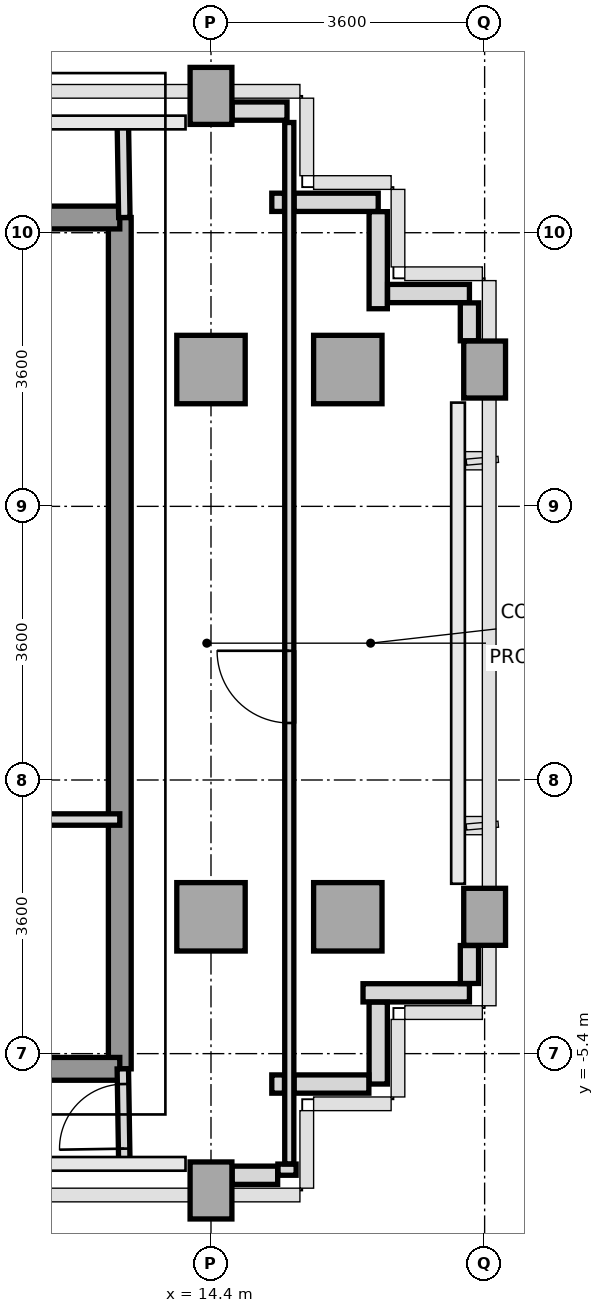
"""IFC4 building model, lengths in metres.
Left out: names, types, materials, properties, quantities, classifications, styles, units other than length and angle.
Written with IfcOpenShell. Run it as: python <this file> out.ifc"""

import sys

from ifc_helpers import new_model, si_unit, direction, frame, frame_2d, origin, origin_2d, place, context, subcontext, project, spatial, rectangle, extrude, source, transform, mapped, element, fill, save


model = new_model("IFC4")
c1 = context("Model", 3, precision=1e-05, world=origin(), true_north=direction((0.0, 1.0)))
c2 = subcontext(c1, "Body", "Model", "MODEL_VIEW")
j1 = project(units=[si_unit("LENGTHUNIT", "METRE"), si_unit("PLANEANGLEUNIT", "RADIAN")], contexts=[c1])
p1 = place(None, origin())
s1 = spatial("IfcSite", under=j1, at=p1, CompositionType="ELEMENT")
p2 = place(p1, origin())
s2 = spatial("IfcBuilding", under=s1, at=p2, CompositionType="ELEMENT")
p3 = place(p2, frame((0.0, 0.0, 239.6)))
s3 = spatial("IfcBuildingStorey", under=s2, at=p3, CompositionType="ELEMENT", Elevation=239.6)
m1 = source(origin(), c2, "Body", "SweptSolid", [
    extrude(rectangle(XDim=0.55, YDim=0.75, at=origin_2d()), origin(), (0.0, 0.0, 1.0), 3.01),
])
p4 = place(p3, frame((14.4, -7.2, 0.0), z_axis=(0.0, 0.0, 1.0), x_axis=(1.0, 0.0, 0.0)))
e1 = element("IfcColumn", 1, at=p4, inside=s3, PredefinedType="COLUMN", context=c2, shape_type="MappedRepresentation", body=[
    mapped(m1, transform((0.0, 0.0, 0.0), x_axis=(1.0, 0.0, 0.0), y_axis=(0.0, 1.0, 0.0), z_axis=(0.0, 0.0, 1.0), scale=1.0)),
])
m2 = source(origin(), c2, "Body", "SweptSolid", [
    extrude(rectangle(XDim=0.9, YDim=0.9, at=origin_2d()), origin(), (0.0, 0.0, 1.0), 3.01),
])
for number, where, z_axis, x_axis in (
    (2, (14.4, -3.6, 0.0), (0.0, 0.0, 1.0), (1.0, 0.0, 0.0)),
    (3, (14.4, 3.6, 0.0), (0.0, 0.0, 1.0), (1.0, 0.0, 0.0)),
):
    element("IfcColumn", number, at=place(p3, frame(where, z_axis=z_axis, x_axis=x_axis)), inside=s3, PredefinedType="COLUMN", context=c2, shape_type="MappedRepresentation", body=[
        mapped(m2, transform((0.0, 0.0, 0.0), x_axis=(1.0, 0.0, 0.0), y_axis=(0.0, 1.0, 0.0), z_axis=(0.0, 0.0, 1.0), scale=1.0)),
    ])
p5 = place(p3, frame((14.4, 7.2, 0.0), z_axis=(0.0, 0.0, 1.0), x_axis=(1.0, 0.0, 0.0)))
e4 = element("IfcColumn", 4, at=p5, inside=s3, PredefinedType="COLUMN", context=c2, shape_type="MappedRepresentation", body=[
    mapped(m1, transform((0.0, 0.0, 0.0), x_axis=(1.0, 0.0, 0.0), y_axis=(0.0, 1.0, 0.0), z_axis=(0.0, 0.0, 1.0), scale=1.0)),
])
for number, where, z_axis, x_axis in (
    (5, (16.2, -3.6, 0.0), (0.0, 0.0, 1.0), (1.0, 0.0, 0.0)),
    (6, (16.2, 3.6, 0.0), (0.0, 0.0, 1.0), (1.0, 0.0, 0.0)),
):
    element("IfcColumn", number, at=place(p3, frame(where, z_axis=z_axis, x_axis=x_axis)), inside=s3, PredefinedType="COLUMN", context=c2, shape_type="MappedRepresentation", body=[
        mapped(m2, transform((0.0, 0.0, 0.0), x_axis=(1.0, 0.0, 0.0), y_axis=(0.0, 1.0, 0.0), z_axis=(0.0, 0.0, 1.0), scale=1.0)),
    ])
for number, where, z_axis, x_axis in (
    (7, (18.0, -3.6, 0.0), (0.0, 0.0, 1.0), (1.0, 0.0, 0.0)),
    (8, (18.0, 3.6, 0.0), (0.0, 0.0, 1.0), (1.0, 0.0, 0.0)),
):
    element("IfcColumn", number, at=place(p3, frame(where, z_axis=z_axis, x_axis=x_axis)), inside=s3, PredefinedType="COLUMN", context=c2, shape_type="MappedRepresentation", body=[
        mapped(m1, transform((0.0, 0.0, 0.0), x_axis=(1.0, 0.0, 0.0), y_axis=(0.0, 1.0, 0.0), z_axis=(0.0, 0.0, 1.0), scale=1.0)),
    ])
p6 = place(p3, frame((17.8, -4.6, 0.0), z_axis=(0.0, 0.0, 1.0), x_axis=(-1.0, 0.0, 0.0)))
e9 = element("IfcWall", 9, at=p6, inside=s3, PredefinedType="PARAPET", context=c2, shape_type="SweptSolid", body=[
    extrude(rectangle(XDim=1.4, YDim=0.24, at=frame_2d((0.7, 0.0))), origin(), (0.0, 0.0, 1.0), 1.15),
])
p7 = place(p3, frame((16.6, -4.723, 0.0), z_axis=(0.0, 0.0, 1.0), x_axis=(0.0, -1.0, 0.0)))
e10 = element("IfcWall", 10, at=p7, inside=s3, PredefinedType="PARAPET", context=c2, shape_type="SweptSolid", body=[
    extrude(rectangle(XDim=1.077, YDim=0.24, at=frame_2d((0.539, 0.0))), origin(), (0.0, 0.0, 1.0), 1.15),
])
p8 = place(p3, frame((16.477, -5.8, 0.0), z_axis=(0.0, 0.0, 1.0), x_axis=(-1.0, 0.0, 0.0)))
e11 = element("IfcWall", 11, at=p8, inside=s3, PredefinedType="PARAPET", context=c2, shape_type="SweptSolid", body=[
    extrude(rectangle(XDim=0.984, YDim=0.24, at=frame_2d((0.492, 0.0))), origin(), (0.0, 0.0, 1.0), 1.15),
])
p9 = place(p3, frame((15.367, -5.8, 0.0), z_axis=(0.0, 0.0, 1.0), x_axis=(-1.0, 0.0, 0.0)))
e12 = element("IfcWall", 12, at=p9, inside=s3, PredefinedType="PARAPET", context=c2, shape_type="SweptSolid", body=[
    extrude(rectangle(XDim=0.167, YDim=0.24, at=frame_2d((0.083, 0.0))), origin(), (0.0, 0.0, 1.0), 1.15),
])
p10 = place(p3, frame((15.4, -6.853, 0.0), z_axis=(0.0, 0.0, 1.0), x_axis=(0.0, -1.0, 0.0)))
e13 = element("IfcWall", 13, at=p10, inside=s3, PredefinedType="PARAPET", context=c2, shape_type="SweptSolid", body=[
    extrude(rectangle(XDim=0.147, YDim=0.24, at=frame_2d((0.073, 0.0))), origin(), (0.0, 0.0, 1.0), 1.15),
])
p11 = place(p3, frame((15.277, -7.0, 0.0), z_axis=(0.0, 0.0, 1.0), x_axis=(-1.0, 0.0, 0.0)))
e14 = element("IfcWall", 14, at=p11, inside=s3, PredefinedType="PARAPET", context=c2, shape_type="SweptSolid", body=[
    extrude(rectangle(XDim=0.599, YDim=0.24, at=frame_2d((0.3, 0.0))), origin(), (0.0, 0.0, 1.0), 1.15),
])
p12 = place(p3, frame((14.678, 7.0, 0.0), z_axis=(0.0, 0.0, 1.0), x_axis=(1.0, 0.0, 0.0)))
e15 = element("IfcWall", 15, at=p12, inside=s3, PredefinedType="PARAPET", context=c2, shape_type="SweptSolid", body=[
    extrude(rectangle(XDim=0.722, YDim=0.24, at=frame_2d((0.361, 0.0))), origin(), (0.0, 0.0, 1.0), 1.15),
])
p13 = place(p3, frame((15.2, 5.8, 0.0), z_axis=(0.0, 0.0, 1.0), x_axis=(1.0, 0.0, 0.0)))
e16 = element("IfcWall", 16, at=p13, inside=s3, PredefinedType="PARAPET", context=c2, shape_type="SweptSolid", body=[
    extrude(rectangle(XDim=0.167, YDim=0.24, at=frame_2d((0.083, 0.0))), origin(), (0.0, 0.0, 1.0), 1.15),
])
p14 = place(p3, frame((15.493, 5.8, 0.0), z_axis=(0.0, 0.0, 1.0), x_axis=(1.0, 0.0, 0.0)))
e17 = element("IfcWall", 17, at=p14, inside=s3, PredefinedType="PARAPET", context=c2, shape_type="SweptSolid", body=[
    extrude(rectangle(XDim=1.107, YDim=0.24, at=frame_2d((0.554, 0.0))), origin(), (0.0, 0.0, 1.0), 1.15),
])
p15 = place(p3, frame((16.6, 5.677, 0.0), z_axis=(0.0, 0.0, 1.0), x_axis=(0.0, -1.0, 0.0)))
e18 = element("IfcWall", 18, at=p15, inside=s3, PredefinedType="PARAPET", context=c2, shape_type="SweptSolid", body=[
    extrude(rectangle(XDim=1.277, YDim=0.24, at=frame_2d((0.639, 0.0))), origin(), (0.0, 0.0, 1.0), 1.15),
])
p16 = place(p3, frame((16.723, 4.6, 0.0), z_axis=(0.0, 0.0, 1.0), x_axis=(1.0, 0.0, 0.0)))
e19 = element("IfcWall", 19, at=p16, inside=s3, PredefinedType="PARAPET", context=c2, shape_type="SweptSolid", body=[
    extrude(rectangle(XDim=1.077, YDim=0.24, at=frame_2d((0.539, 0.0))), origin(), (0.0, 0.0, 1.0), 1.15),
])
for number, where, z_axis, x_axis in (
    (20, (17.8, 4.477, 0.0), (0.0, 0.0, 1.0), (0.0, -1.0, 0.0)),
    (21, (17.8, -3.978, 0.0), (0.0, 0.0, 1.0), (0.0, -1.0, 0.0)),
):
    element("IfcWall", number, at=place(p3, frame(where, z_axis=z_axis, x_axis=x_axis)), inside=s3, PredefinedType="PARAPET", context=c2, shape_type="SweptSolid", body=[
        extrude(rectangle(XDim=0.499, YDim=0.24, at=frame_2d((0.25, 0.0))), origin(), (0.0, 0.0, 1.0), 1.15),
    ])
p17 = place(p3, frame((13.2, -5.6, 0.0), z_axis=(0.0, 0.0, 1.0), x_axis=(0.0, 1.0, 0.0)))
e22 = element("IfcWall", 22, at=p17, inside=s3, PredefinedType="SHEAR", context=c2, shape_type="SweptSolid", body=[
    extrude(rectangle(XDim=11.2, YDim=0.3, at=frame_2d((5.6, 0.0))), origin(), (0.0, 0.0, 1.0), 3.01),
])
p18 = place(p3, frame((11.356, 5.6, 0.0), z_axis=(0.0, 0.0, 1.0), x_axis=(1.0, 0.0, 0.0)))
e23 = element("IfcWall", 23, at=p18, inside=s3, PredefinedType="SHEAR", context=c2, shape_type="SweptSolid", body=[
    extrude(rectangle(XDim=1.844, YDim=0.3, at=frame_2d((0.922, 0.0))), origin(), (0.0, 0.0, 1.0), 3.01),
])
p19 = place(p3, frame((5.4, -5.6, 0.0), z_axis=(0.0, 0.0, 1.0), x_axis=(1.0, 0.0, 0.0)))
e24 = element("IfcWall", 24, at=p19, inside=s3, PredefinedType="SHEAR", context=c2, shape_type="SweptSolid", body=[
    extrude(rectangle(XDim=7.8, YDim=0.3, at=frame_2d((3.9, 0.0))), origin(), (0.0, 0.0, 1.0), 3.01),
])
p20 = place(p19, frame((5.85, 0.0, 0.0)))
e25 = element("IfcOpeningElement", 25, at=p20, cuts=e24, PredefinedType="OPENING", context=c2, shape_type="SweptSolid", body=[
    extrude(rectangle(XDim=0.8, YDim=2.1, at=frame_2d((0.4, 1.05))), frame((0.0, 0.16, 0.0), z_axis=(0.0, -1.0, 0.0), x_axis=(1.0, 0.0, 0.0)), (0.0, 0.0, 1.0), 0.32),
])
p21 = place(p19, frame((3.4, 0.0, 0.0)))
e26 = element("IfcOpeningElement", 26, at=p21, cuts=e24, PredefinedType="OPENING", context=c2, shape_type="SweptSolid", body=[
    extrude(rectangle(XDim=0.95, YDim=2.15, at=frame_2d((0.475, 1.075))), frame((0.0, 0.16, 0.0), z_axis=(0.0, -1.0, 0.0), x_axis=(1.0, 0.0, 0.0)), (0.0, 0.0, 1.0), 0.32),
])
p22 = place(p3, frame((11.02, -2.32, 0.0), z_axis=(0.0, 0.0, 1.0), x_axis=(1.0, 0.0, 0.0)))
e27 = element("IfcWall", 27, at=p22, inside=s3, PredefinedType="PARTITIONING", context=c2, shape_type="SweptSolid", body=[
    extrude(rectangle(XDim=2.18, YDim=0.15, at=frame_2d((1.09, 0.0))), origin(), (0.0, 0.0, 1.0), 3.01),
])
p23 = place(p3, frame((13.26, 5.6, 0.0), z_axis=(0.0, 0.0, 1.0), x_axis=(-0.016013571389, 0.999871774545, 0.0)))
e28 = element("IfcWall", 28, at=p23, inside=s3, PredefinedType="PARTITIONING", context=c2, shape_type="SweptSolid", body=[
    extrude(rectangle(XDim=1.25, YDim=0.15, at=frame_2d((0.625, 0.0))), origin(), (0.0, 0.0, 1.0), 3.01),
])
p24 = place(p3, frame((13.26, -6.85, 0.0), z_axis=(0.0, 0.0, 1.0), x_axis=(-0.016013571389, 0.999871774545, 0.0)))
e29 = element("IfcWall", 29, at=p24, inside=s3, PredefinedType="PARTITIONING", context=c2, shape_type="SweptSolid", body=[
    extrude(rectangle(XDim=1.25, YDim=0.15, at=frame_2d((0.625, 0.0))), origin(), (0.0, 0.0, 1.0), 3.01),
])
p25 = place(p24, frame((0.2, 0.0, 0.0)))
e30 = element("IfcOpeningElement", 30, at=p25, cuts=e29, PredefinedType="OPENING", context=c2, shape_type="SweptSolid", body=[
    extrude(rectangle(XDim=0.85, YDim=2.1, at=frame_2d((0.425, 1.05))), frame((0.0, 0.085, 0.0), z_axis=(0.0, -1.0, 0.0), x_axis=(1.0, 0.0, 0.0)), (0.0, 0.0, 1.0), 0.17),
])
p26 = place(p3, frame((15.43, -6.85, 0.0), z_axis=(0.0, 0.0, 1.0), x_axis=(0.0, 1.0, 0.0)))
e31 = element("IfcWall", 31, at=p26, inside=s3, PredefinedType="PARTITIONING", context=c2, shape_type="SweptSolid", body=[
    extrude(rectangle(XDim=13.7, YDim=0.12, at=frame_2d((6.85, 0.0))), origin(), (0.0, 0.0, 1.0), 3.01),
])
p27 = place(p26, frame((5.8, 0.0, 0.0)))
e32 = element("IfcOpeningElement", 32, at=p27, cuts=e31, PredefinedType="OPENING", context=c2, shape_type="SweptSolid", body=[
    extrude(rectangle(XDim=0.95, YDim=2.15, at=frame_2d((0.475, 1.075))), frame((0.0, 0.07, 0.0), z_axis=(0.0, -1.0, 0.0), x_axis=(1.0, 0.0, 0.0)), (0.0, 0.0, 1.0), 0.14),
])
m3 = source(origin(), c2, "Body", "SweptSolid", [
    extrude(rectangle(XDim=0.85, YDim=2.1, at=frame_2d((0.425, 1.05))), frame((0.0, 0.025, 0.0), z_axis=(0.0, -1.0, 0.0), x_axis=(1.0, 0.0, 0.0)), (0.0, 0.0, 1.0), 0.05),
])
p28 = place(p25, origin())
e33 = element("IfcDoor", 33, at=p28, inside=s3, OperationType="SINGLE_SWING_LEFT", PredefinedType="DOOR", context=c2, shape_type="MappedRepresentation", body=[
    mapped(m3, transform((0.0, 0.0, 0.0), x_axis=(1.0, 0.0, 0.0), y_axis=(0.0, 1.0, 0.0), z_axis=(0.0, 0.0, 1.0), scale=1.0)),
])
fill(e30, e33)
m4 = source(origin(), c2, "Body", "SweptSolid", [
    extrude(rectangle(XDim=0.95, YDim=2.15, at=frame_2d((0.475, 1.075))), frame((0.0, 0.025, 0.0), z_axis=(0.0, -1.0, 0.0), x_axis=(1.0, 0.0, 0.0)), (0.0, 0.0, 1.0), 0.05),
])
p29 = place(p27, origin())
e34 = element("IfcDoor", 34, at=p29, inside=s3, OperationType="SINGLE_SWING_RIGHT", PredefinedType="DOOR", context=c2, shape_type="MappedRepresentation", body=[
    mapped(m4, transform((0.0, 0.0, 0.0), x_axis=(1.0, 0.0, 0.0), y_axis=(0.0, 1.0, 0.0), z_axis=(0.0, 0.0, 1.0), scale=1.0)),
])
fill(e32, e34)
save(model, sys.argv[1])
